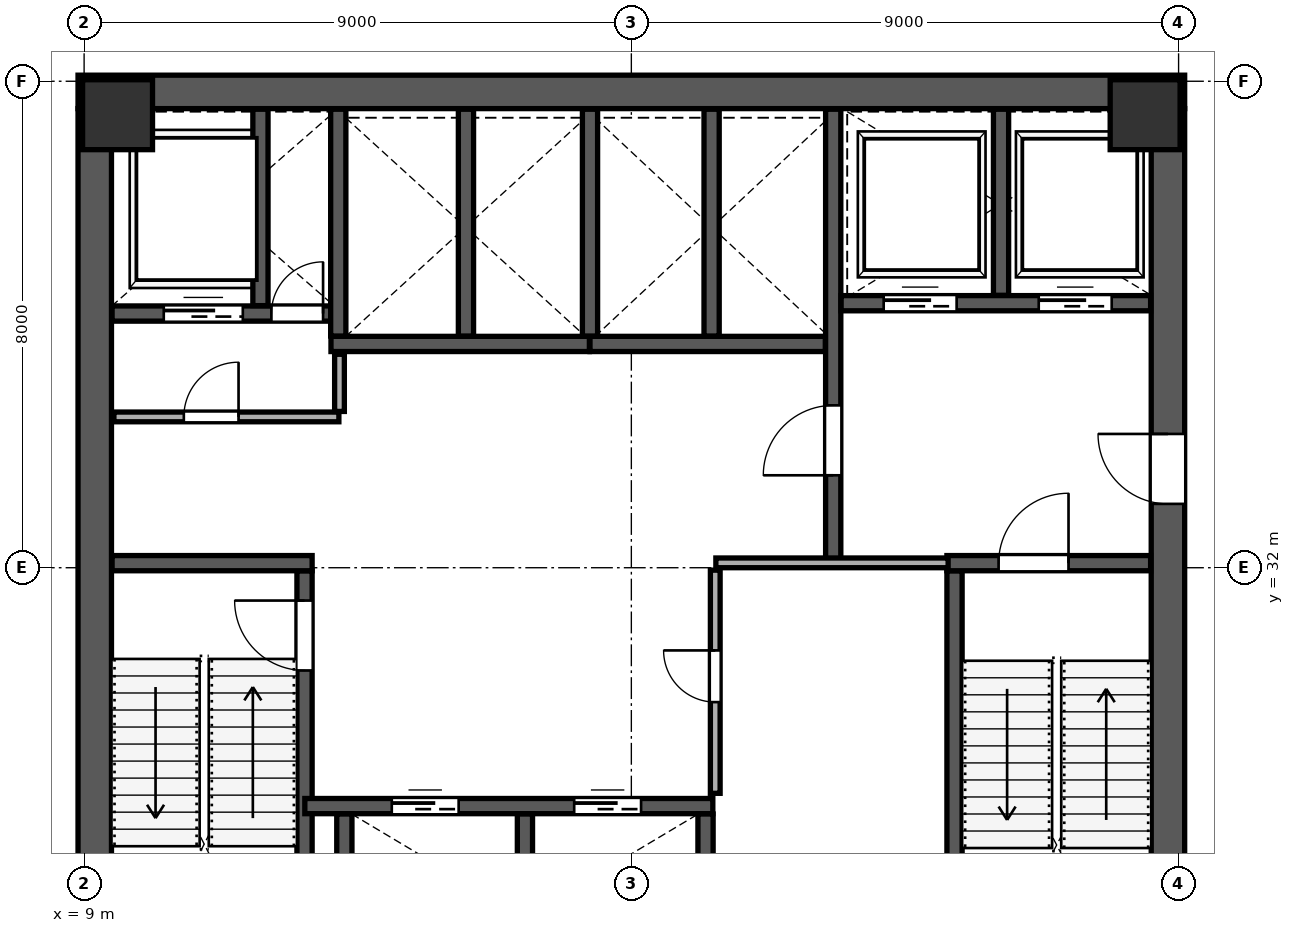
"""IFC4 building model, lengths in metres.
Left out: names, types, materials, properties, quantities, classifications, styles, units other than length and angle.
Written with IfcOpenShell. Run it as: python <this file> out.ifc"""

import sys

from ifc_helpers import new_model, si_unit, direction, frame, frame_2d, origin, origin_2d, place, context, subcontext, project, spatial, rectangle, extrude, source, transform, mapped, element, fill, save


model = new_model("IFC4")
c1 = context("Model", 3, precision=1e-05, world=origin(), true_north=direction((0.0, 1.0)))
c2 = subcontext(c1, "Body", "Model", "MODEL_VIEW")
j1 = project(units=[si_unit("LENGTHUNIT", "METRE"), si_unit("PLANEANGLEUNIT", "RADIAN")], contexts=[c1])
p1 = place(None, origin())
s1 = spatial("IfcSite", under=j1, at=p1, CompositionType="ELEMENT")
p2 = place(p1, origin())
s2 = spatial("IfcBuilding", under=s1, at=p2, CompositionType="ELEMENT")
p3 = place(p2, frame((0.0, 0.0, 87.4)))
s3 = spatial("IfcBuildingStorey", under=s2, at=p3, CompositionType="ELEMENT", Elevation=87.4)
m1 = source(origin(), c2, "Body", "SweptSolid", [
    extrude(rectangle(XDim=1.15, YDim=1.15, at=origin_2d()), origin(), (0.0, 0.0, 1.0), 4.199),
])
for number, where, z_axis, x_axis in (
    (1, (9.55, 39.45, 0.001), (0.0, 0.0, 1.0), (1.0, 0.0, 0.0)),
    (2, (26.45, 39.45, 0.001), (0.0, 0.0, 1.0), (1.0, 0.0, 0.0)),
):
    element("IfcColumn", number, at=place(p3, frame(where, z_axis=z_axis, x_axis=x_axis)), inside=s3, PredefinedType="COLUMN", context=c2, shape_type="MappedRepresentation", body=[
        mapped(m1, transform((0.0, 0.0, 0.0), scale=1.0)),
    ])
p4 = place(p3, frame((9.175, 24.45, 0.0), z_axis=(0.0, 0.0, 1.0), x_axis=(0.0, 1.0, 0.0)))
e3 = element("IfcWall", 3, at=p4, inside=s3, PredefinedType="SHEAR", context=c2, shape_type="SweptSolid", body=[
    extrude(rectangle(XDim=15.1, YDim=0.55, at=frame_2d((7.55, 0.0))), origin(), (0.0, 0.0, 1.0), 3.96),
])
p5 = place(p3, frame((26.825, 24.45, 0.0), z_axis=(0.0, 0.0, 1.0), x_axis=(0.0, 1.0, 0.0)))
e4 = element("IfcWall", 4, at=p5, inside=s3, PredefinedType="SHEAR", context=c2, shape_type="SweptSolid", body=[
    extrude(rectangle(XDim=15.1, YDim=0.55, at=frame_2d((7.55, 0.0))), origin(), (0.0, 0.0, 1.0), 3.96),
])
p6 = place(p5, frame((8.6, 0.0, 0.0)))
e5 = element("IfcOpeningElement", 5, at=p6, cuts=e4, PredefinedType="OPENING", context=c2, shape_type="SweptSolid", body=[
    extrude(rectangle(XDim=1.15, YDim=2.2, at=frame_2d((0.575, 1.1))), frame((0.0, 0.285, 0.0), z_axis=(0.0, -1.0, 0.0), x_axis=(1.0, 0.0, 0.0)), (0.0, 0.0, 1.0), 0.57),
])
p7 = place(p3, frame((8.9, 39.825, 0.0), z_axis=(0.0, 0.0, 1.0), x_axis=(1.0, 0.0, 0.0)))
e6 = element("IfcWall", 6, at=p7, inside=s3, PredefinedType="SHEAR", context=c2, shape_type="SweptSolid", body=[
    extrude(rectangle(XDim=18.2, YDim=0.55, at=frame_2d((9.1, 0.0))), origin(), (0.0, 0.0, 1.0), 3.96),
])
p8 = place(p3, frame((12.625, 24.46, 0.0), z_axis=(0.0, 0.0, 1.0), x_axis=(0.0, 1.0, 0.0)))
e7 = element("IfcWall", 7, at=p8, inside=s3, PredefinedType="SHEAR", context=c2, shape_type="SweptSolid", body=[
    extrude(rectangle(XDim=7.49, YDim=0.25, at=frame_2d((3.745, 0.0))), origin(), (0.0, 0.0, 1.0), 3.96),
])
p9 = place(p8, frame((5.85, 0.0, 0.0)))
e8 = element("IfcOpeningElement", 8, at=p9, cuts=e7, PredefinedType="OPENING", context=c2, shape_type="SweptSolid", body=[
    extrude(rectangle(XDim=1.15, YDim=2.2, at=frame_2d((0.575, 1.1))), frame((0.0, 0.135, 0.0), z_axis=(0.0, -1.0, 0.0), x_axis=(1.0, 0.0, 0.0)), (0.0, 0.0, 1.0), 0.27),
])
p10 = place(p3, frame((9.46, 32.075, 0.0), z_axis=(0.0, 0.0, 1.0), x_axis=(1.0, 0.0, 0.0)))
e9 = element("IfcWall", 9, at=p10, inside=s3, PredefinedType="SHEAR", context=c2, shape_type="SweptSolid", body=[
    extrude(rectangle(XDim=3.29, YDim=0.25, at=frame_2d((1.645, 0.0))), origin(), (0.0, 0.0, 1.0), 3.96),
])
p11 = place(p3, frame((23.315, 24.46, 0.0), z_axis=(0.0, 0.0, 1.0), x_axis=(0.0, 1.0, 0.0)))
e10 = element("IfcWall", 10, at=p11, inside=s3, PredefinedType="SHEAR", context=c2, shape_type="SweptSolid", body=[
    extrude(rectangle(XDim=7.49, YDim=0.25, at=frame_2d((3.745, 0.0))), origin(), (0.0, 0.0, 1.0), 3.96),
])
p12 = place(p3, frame((23.19, 32.075, 0.0), z_axis=(0.0, 0.0, 1.0), x_axis=(1.0, 0.0, 0.0)))
e11 = element("IfcWall", 11, at=p12, inside=s3, PredefinedType="SHEAR", context=c2, shape_type="SweptSolid", body=[
    extrude(rectangle(XDim=3.35, YDim=0.25, at=frame_2d((1.675, 0.0))), origin(), (0.0, 0.0, 1.0), 3.96),
])
p13 = place(p12, frame((0.85, 0.0, 0.0)))
e12 = element("IfcOpeningElement", 12, at=p13, cuts=e11, PredefinedType="OPENING", context=c2, shape_type="SweptSolid", body=[
    extrude(rectangle(XDim=1.15, YDim=2.2, at=frame_2d((0.575, 1.1))), frame((0.0, 0.135, 0.0), z_axis=(0.0, -1.0, 0.0), x_axis=(1.0, 0.0, 0.0)), (0.0, 0.0, 1.0), 0.27),
])
p14 = place(p3, frame((21.32, 32.12, 0.0), z_axis=(0.0, 0.0, 1.0), x_axis=(0.0, 1.0, 0.0)))
e13 = element("IfcWall", 13, at=p14, inside=s3, PredefinedType="SHEAR", context=c2, shape_type="SweptSolid", body=[
    extrude(rectangle(XDim=7.42, YDim=0.25, at=frame_2d((3.71, 0.0))), origin(), (0.0, 0.0, 1.0), 3.96),
])
p15 = place(p14, frame((1.4, 0.0, 0.0)))
e14 = element("IfcOpeningElement", 14, at=p15, cuts=e13, PredefinedType="OPENING", context=c2, shape_type="SweptSolid", body=[
    extrude(rectangle(XDim=1.15, YDim=2.2, at=frame_2d((0.575, 1.1))), frame((0.0, 0.135, 0.0), z_axis=(0.0, -1.0, 0.0), x_axis=(1.0, 0.0, 0.0)), (0.0, 0.0, 1.0), 0.27),
])
p16 = place(p3, frame((9.46, 36.18, 0.0), z_axis=(0.0, 0.0, 1.0), x_axis=(1.0, 0.0, 0.0)))
e15 = element("IfcWall", 15, at=p16, inside=s3, PredefinedType="SHEAR", context=c2, shape_type="SweptSolid", body=[
    extrude(rectangle(XDim=3.79, YDim=0.25, at=frame_2d((1.895, 0.0))), origin(), (0.0, 0.0, 1.0), 3.96),
])
p17 = place(p16, frame((2.62, 0.0, 0.0)))
e16 = element("IfcOpeningElement", 16, at=p17, cuts=e15, PredefinedType="OPENING", context=c2, shape_type="SweptSolid", body=[
    extrude(rectangle(XDim=0.85, YDim=2.1, at=frame_2d((0.425, 1.05))), frame((0.0, 0.135, 0.0), z_axis=(0.0, -1.0, 0.0), x_axis=(1.0, 0.0, 0.0)), (0.0, 0.0, 1.0), 0.27),
])
p18 = place(p16, frame((0.85, 0.0, 0.0)))
e17 = element("IfcOpeningElement", 17, at=p18, cuts=e15, PredefinedType="OPENING", context=c2, shape_type="SweptSolid", body=[
    extrude(rectangle(XDim=1.3, YDim=2.25, at=frame_2d((0.65, 1.125))), frame((0.0, 0.135, 0.0), z_axis=(0.0, -1.0, 0.0), x_axis=(1.0, 0.0, 0.0)), (0.0, 0.0, 1.0), 0.27),
])
p19 = place(p3, frame((11.9, 36.31, 0.0), z_axis=(0.0, 0.0, 1.0), x_axis=(0.0, 1.0, 0.0)))
e18 = element("IfcWall", 18, at=p19, inside=s3, PredefinedType="SHEAR", context=c2, shape_type="SweptSolid", body=[
    extrude(rectangle(XDim=3.23, YDim=0.25, at=frame_2d((1.615, 0.0))), origin(), (0.0, 0.0, 1.0), 3.96),
])
p20 = place(p3, frame((21.45, 36.35, 0.0), z_axis=(0.0, 0.0, 1.0), x_axis=(1.0, 0.0, 0.0)))
e19 = element("IfcWall", 19, at=p20, inside=s3, PredefinedType="SHEAR", context=c2, shape_type="SweptSolid", body=[
    extrude(rectangle(XDim=5.09, YDim=0.25, at=frame_2d((2.545, 0.0))), origin(), (0.0, 0.0, 1.0), 3.96),
])
p21 = place(p20, frame((0.7, 0.0, 0.0)))
e20 = element("IfcOpeningElement", 20, at=p21, cuts=e19, PredefinedType="OPENING", context=c2, shape_type="SweptSolid", body=[
    extrude(rectangle(XDim=1.2, YDim=2.2, at=frame_2d((0.6, 1.1))), frame((0.0, 0.135, 0.0), z_axis=(0.0, -1.0, 0.0), x_axis=(1.0, 0.0, 0.0)), (0.0, 0.0, 1.0), 0.27),
])
p22 = place(p20, frame((3.25, 0.0, 0.0)))
e21 = element("IfcOpeningElement", 21, at=p22, cuts=e19, PredefinedType="OPENING", context=c2, shape_type="SweptSolid", body=[
    extrude(rectangle(XDim=1.2, YDim=2.2, at=frame_2d((0.6, 1.1))), frame((0.0, 0.135, 0.0), z_axis=(0.0, -1.0, 0.0), x_axis=(1.0, 0.0, 0.0)), (0.0, 0.0, 1.0), 0.27),
])
p23 = place(p3, frame((24.08, 36.48, 0.0), z_axis=(0.0, 0.0, 1.0), x_axis=(0.0, 1.0, 0.0)))
e22 = element("IfcWall", 22, at=p23, inside=s3, PredefinedType="SHEAR", context=c2, shape_type="SweptSolid", body=[
    extrude(rectangle(XDim=3.06, YDim=0.25, at=frame_2d((1.53, 0.0))), origin(), (0.0, 0.0, 1.0), 3.96),
])
p24 = place(p3, frame((12.63, 28.08, 0.0), z_axis=(0.0, 0.0, 1.0), x_axis=(1.0, 0.0, 0.0)))
e23 = element("IfcWall", 23, at=p24, inside=s3, PredefinedType="SHEAR", context=c2, shape_type="SweptSolid", body=[
    extrude(rectangle(XDim=6.71, YDim=0.25, at=frame_2d((3.355, 0.0))), origin(), (0.0, 0.0, 1.0), 3.96),
])
p25 = place(p24, frame((1.43, 0.0, 0.0)))
e24 = element("IfcOpeningElement", 24, at=p25, cuts=e23, PredefinedType="OPENING", context=c2, shape_type="SweptSolid", body=[
    extrude(rectangle(XDim=1.1, YDim=2.2, at=frame_2d((0.55, 1.1))), frame((0.0, 0.135, 0.0), z_axis=(0.0, -1.0, 0.0), x_axis=(1.0, 0.0, 0.0)), (0.0, 0.0, 1.0), 0.27),
])
p26 = place(p24, frame((4.43, 0.0, 0.0)))
e25 = element("IfcOpeningElement", 25, at=p26, cuts=e23, PredefinedType="OPENING", context=c2, shape_type="SweptSolid", body=[
    extrude(rectangle(XDim=1.1, YDim=2.2, at=frame_2d((0.55, 1.1))), frame((0.0, 0.135, 0.0), z_axis=(0.0, -1.0, 0.0), x_axis=(1.0, 0.0, 0.0)), (0.0, 0.0, 1.0), 0.27),
])
for number, where, z_axis, x_axis in (
    (26, (13.28, 24.46, 0.0), (0.0, 0.0, 1.0), (0.0, 1.0, 0.0)),
    (27, (16.25, 24.46, 0.0), (0.0, 0.0, 1.0), (0.0, 1.0, 0.0)),
    (28, (19.22, 24.46, 0.0), (0.0, 0.0, 1.0), (0.0, 1.0, 0.0)),
):
    element("IfcWall", number, at=place(p3, frame(where, z_axis=z_axis, x_axis=x_axis)), inside=s3, PredefinedType="SHEAR", context=c2, shape_type="SweptSolid", body=[
        extrude(rectangle(XDim=3.49, YDim=0.25, at=frame_2d((1.745, 0.0))), origin(), (0.0, 0.0, 1.0), 3.96),
    ])
p27 = place(p3, frame((13.06, 35.68, 0.0), z_axis=(0.0, 0.0, 1.0), x_axis=(1.0, 0.0, 0.0)))
e29 = element("IfcWall", 29, at=p27, inside=s3, PredefinedType="SHEAR", context=c2, shape_type="SweptSolid", body=[
    extrude(rectangle(XDim=4.25, YDim=0.25, at=frame_2d((2.125, 0.0))), origin(), (0.0, 0.0, 1.0), 3.96),
])
for number, where, z_axis, x_axis in (
    (30, (13.18, 35.81, 0.0), (0.0, 0.0, 1.0), (0.0, 1.0, 0.0)),
    (31, (15.28, 35.81, 0.0), (0.0, 0.0, 1.0), (0.0, 1.0, 0.0)),
):
    element("IfcWall", number, at=place(p3, frame(where, z_axis=z_axis, x_axis=x_axis)), inside=s3, PredefinedType="SHEAR", context=c2, shape_type="SweptSolid", body=[
        extrude(rectangle(XDim=3.73, YDim=0.25, at=frame_2d((1.865, 0.0))), origin(), (0.0, 0.0, 1.0), 3.96),
    ])
p28 = place(p3, frame((17.32, 35.68, 0.0), z_axis=(0.0, 0.0, 1.0), x_axis=(1.0, 0.0, 0.0)))
e32 = element("IfcWall", 32, at=p28, inside=s3, PredefinedType="SHEAR", context=c2, shape_type="SweptSolid", body=[
    extrude(rectangle(XDim=3.87, YDim=0.25, at=frame_2d((1.935, 0.0))), origin(), (0.0, 0.0, 1.0), 3.96),
])
for number, where, z_axis, x_axis in (
    (33, (17.32, 35.81, 0.0), (0.0, 0.0, 1.0), (0.0, 1.0, 0.0)),
    (34, (19.32, 35.81, 0.0), (0.0, 0.0, 1.0), (0.0, 1.0, 0.0)),
):
    element("IfcWall", number, at=place(p3, frame(where, z_axis=z_axis, x_axis=x_axis)), inside=s3, PredefinedType="SHEAR", context=c2, shape_type="SweptSolid", body=[
        extrude(rectangle(XDim=3.73, YDim=0.25, at=frame_2d((1.865, 0.0))), origin(), (0.0, 0.0, 1.0), 3.96),
    ])
p29 = place(p3, frame((9.49, 34.48, 0.0), z_axis=(0.0, 0.0, 1.0), x_axis=(1.0, 0.0, 0.0)))
e35 = element("IfcWall", 35, at=p29, inside=s3, PredefinedType="PARTITIONING", context=c2, shape_type="SweptSolid", body=[
    extrude(rectangle(XDim=3.7, YDim=0.16, at=frame_2d((1.85, 0.0))), origin(), (0.0, 0.0, 1.0), 3.96),
])
p30 = place(p29, frame((1.15, 0.0, 0.0)))
e36 = element("IfcOpeningElement", 36, at=p30, cuts=e35, PredefinedType="OPENING", context=c2, shape_type="SweptSolid", body=[
    extrude(rectangle(XDim=0.9, YDim=2.15, at=frame_2d((0.45, 1.075))), frame((0.0, 0.09, 0.0), z_axis=(0.0, -1.0, 0.0), x_axis=(1.0, 0.0, 0.0)), (0.0, 0.0, 1.0), 0.18),
])
p31 = place(p3, frame((13.2, 34.57, 0.0), z_axis=(0.0, 0.0, 1.0), x_axis=(0.0, 1.0, 0.0)))
e37 = element("IfcWall", 37, at=p31, inside=s3, PredefinedType="PARTITIONING", context=c2, shape_type="SweptSolid", body=[
    extrude(rectangle(XDim=0.94, YDim=0.16, at=frame_2d((0.47, 0.0))), origin(), (0.0, 0.0, 1.0), 3.96),
])
p32 = place(p3, frame((19.39, 32.08, 0.0), z_axis=(0.0, 0.0, 1.0), x_axis=(1.0, 0.0, 0.0)))
e38 = element("IfcWall", 38, at=p32, inside=s3, PredefinedType="PARTITIONING", context=c2, shape_type="SweptSolid", body=[
    extrude(rectangle(XDim=3.82, YDim=0.16, at=frame_2d((1.91, 0.0))), origin(), (0.0, 0.0, 1.0), 3.96),
])
p33 = place(p3, frame((19.38, 28.29, 0.0), z_axis=(0.0, 0.0, 1.0), x_axis=(0.0, 1.0, 0.0)))
e39 = element("IfcWall", 39, at=p33, inside=s3, PredefinedType="PARTITIONING", context=c2, shape_type="SweptSolid", body=[
    extrude(rectangle(XDim=3.67, YDim=0.16, at=frame_2d((1.835, 0.0))), origin(), (0.0, 0.0, 1.0), 3.96),
])
p34 = place(p33, frame((1.5, 0.0, 0.0)))
e40 = element("IfcOpeningElement", 40, at=p34, cuts=e39, PredefinedType="OPENING", context=c2, shape_type="SweptSolid", body=[
    extrude(rectangle(XDim=0.85, YDim=2.1, at=frame_2d((0.425, 1.05))), frame((0.0, 0.09, 0.0), z_axis=(0.0, -1.0, 0.0), x_axis=(1.0, 0.0, 0.0)), (0.0, 0.0, 1.0), 0.18),
])
p35 = place(p3, frame((26.504, 12.433, 0.0), z_axis=(0.0, 0.0, 1.0), x_axis=(0.216434476574, 0.976297146032, 0.0)))
e41 = element("IfcWall", 41, at=p35, inside=s3, PredefinedType="PARTITIONING", context=c2, shape_type="SweptSolid", body=[
    extrude(rectangle(XDim=20.38, YDim=0.16, at=frame_2d((10.19, 0.0))), origin(), (0.0, 0.0, 1.0), 3.96),
])
m2 = source(origin(), c2, "Body", "SweptSolid", [
    extrude(rectangle(XDim=1.15, YDim=2.2, at=frame_2d((0.575, 1.1))), frame((0.0, 0.025, 0.0), z_axis=(0.0, -1.0, 0.0), x_axis=(1.0, 0.0, 0.0)), (0.0, 0.0, 1.0), 0.05),
])
p36 = place(p9, origin())
e42 = element("IfcDoor", 42, at=p36, inside=s3, OperationType="SINGLE_SWING_RIGHT", PredefinedType="DOOR", context=c2, shape_type="MappedRepresentation", body=[
    mapped(m2, transform((0.0, 0.0, 0.0), scale=1.0)),
])
fill(e8, e42)
m3 = source(origin(), c2, "Body", "SweptSolid", [
    extrude(rectangle(XDim=1.15, YDim=2.2, at=frame_2d((0.575, 1.1))), frame((0.0, 0.025, 0.0), z_axis=(0.0, -1.0, 0.0), x_axis=(1.0, 0.0, 0.0)), (0.0, 0.0, 1.0), 0.05),
])
p37 = place(p15, origin())
e43 = element("IfcDoor", 43, at=p37, inside=s3, OperationType="SINGLE_SWING_LEFT", PredefinedType="DOOR", context=c2, shape_type="MappedRepresentation", body=[
    mapped(m3, transform((0.0, 0.0, 0.0), scale=1.0)),
])
fill(e14, e43)
p38 = place(p13, origin())
e44 = element("IfcDoor", 44, at=p38, inside=s3, OperationType="SINGLE_SWING_RIGHT", PredefinedType="DOOR", context=c2, shape_type="MappedRepresentation", body=[
    mapped(m2, transform((0.0, 0.0, 0.0), scale=1.0)),
])
fill(e12, e44)
p39 = place(p6, origin())
e45 = element("IfcDoor", 45, at=p39, inside=s3, OperationType="SINGLE_SWING_RIGHT", PredefinedType="DOOR", context=c2, shape_type="MappedRepresentation", body=[
    mapped(m3, transform((0.0, 0.0, 0.0), scale=1.0)),
])
fill(e5, e45)
m4 = source(origin(), c2, "Body", "SweptSolid", [
    extrude(rectangle(XDim=0.85, YDim=2.1, at=frame_2d((0.425, 1.05))), frame((0.0, 0.025, 0.0), z_axis=(0.0, -1.0, 0.0), x_axis=(1.0, 0.0, 0.0)), (0.0, 0.0, 1.0), 0.05),
])
p40 = place(p17, origin())
e46 = element("IfcDoor", 46, at=p40, inside=s3, OperationType="SINGLE_SWING_RIGHT", PredefinedType="DOOR", context=c2, shape_type="MappedRepresentation", body=[
    mapped(m4, transform((0.0, 0.0, 0.0), scale=1.0)),
])
fill(e16, e46)
m5 = source(origin(), c2, "Body", "SweptSolid", [
    extrude(rectangle(XDim=1.1, YDim=2.2, at=frame_2d((0.55, 1.1))), frame((0.0, 0.025, 0.0), z_axis=(0.0, -1.0, 0.0), x_axis=(1.0, 0.0, 0.0)), (0.0, 0.0, 1.0), 0.05),
])
p41 = place(p25, origin())
e47 = element("IfcDoor", 47, at=p41, inside=s3, OperationType="SLIDING_TO_LEFT", PredefinedType="DOOR", context=c2, shape_type="MappedRepresentation", body=[
    mapped(m5, transform((0.0, 0.0, 0.0), scale=1.0)),
])
fill(e24, e47)
p42 = place(p26, origin())
e48 = element("IfcDoor", 48, at=p42, inside=s3, OperationType="SLIDING_TO_RIGHT", PredefinedType="DOOR", context=c2, shape_type="MappedRepresentation", body=[
    mapped(m5, transform((0.0, 0.0, 0.0), scale=1.0)),
])
fill(e25, e48)
m6 = source(origin(), c2, "Body", "SweptSolid", [
    extrude(rectangle(XDim=1.2, YDim=2.2, at=frame_2d((0.6, 1.1))), frame((0.0, 0.025, 0.0), z_axis=(0.0, -1.0, 0.0), x_axis=(1.0, 0.0, 0.0)), (0.0, 0.0, 1.0), 0.05),
])
p43 = place(p21, origin())
e49 = element("IfcDoor", 49, at=p43, inside=s3, OperationType="SLIDING_TO_LEFT", PredefinedType="DOOR", context=c2, shape_type="MappedRepresentation", body=[
    mapped(m6, transform((0.0, 0.0, 0.0), scale=1.0)),
])
fill(e20, e49)
p44 = place(p22, origin())
e50 = element("IfcDoor", 50, at=p44, inside=s3, OperationType="SLIDING_TO_RIGHT", PredefinedType="DOOR", context=c2, shape_type="MappedRepresentation", body=[
    mapped(m6, transform((0.0, 0.0, 0.0), scale=1.0)),
])
fill(e21, e50)
m7 = source(origin(), c2, "Body", "SweptSolid", [
    extrude(rectangle(XDim=1.3, YDim=2.25, at=frame_2d((0.65, 1.125))), frame((0.0, 0.025, 0.0), z_axis=(0.0, -1.0, 0.0), x_axis=(1.0, 0.0, 0.0)), (0.0, 0.0, 1.0), 0.05),
])
p45 = place(p18, origin())
e51 = element("IfcDoor", 51, at=p45, inside=s3, OperationType="SLIDING_TO_LEFT", PredefinedType="DOOR", context=c2, shape_type="MappedRepresentation", body=[
    mapped(m7, transform((0.0, 0.0, 0.0), scale=1.0)),
])
fill(e17, e51)
m8 = source(origin(), c2, "Body", "SweptSolid", [
    extrude(rectangle(XDim=0.9, YDim=2.15, at=frame_2d((0.45, 1.075))), frame((0.0, 0.025, 0.0), z_axis=(0.0, -1.0, 0.0), x_axis=(1.0, 0.0, 0.0)), (0.0, 0.0, 1.0), 0.05),
])
p46 = place(p30, origin())
e52 = element("IfcDoor", 52, at=p46, inside=s3, OperationType="SINGLE_SWING_RIGHT", PredefinedType="DOOR", context=c2, shape_type="MappedRepresentation", body=[
    mapped(m8, transform((0.0, 0.0, 0.0), scale=1.0)),
])
fill(e36, e52)
p47 = place(p34, origin())
e53 = element("IfcDoor", 53, at=p47, inside=s3, OperationType="SINGLE_SWING_RIGHT", PredefinedType="DOOR", context=c2, shape_type="MappedRepresentation", body=[
    mapped(m4, transform((0.0, 0.0, 0.0), scale=1.0)),
])
fill(e40, e53)
save(model, sys.argv[1])
